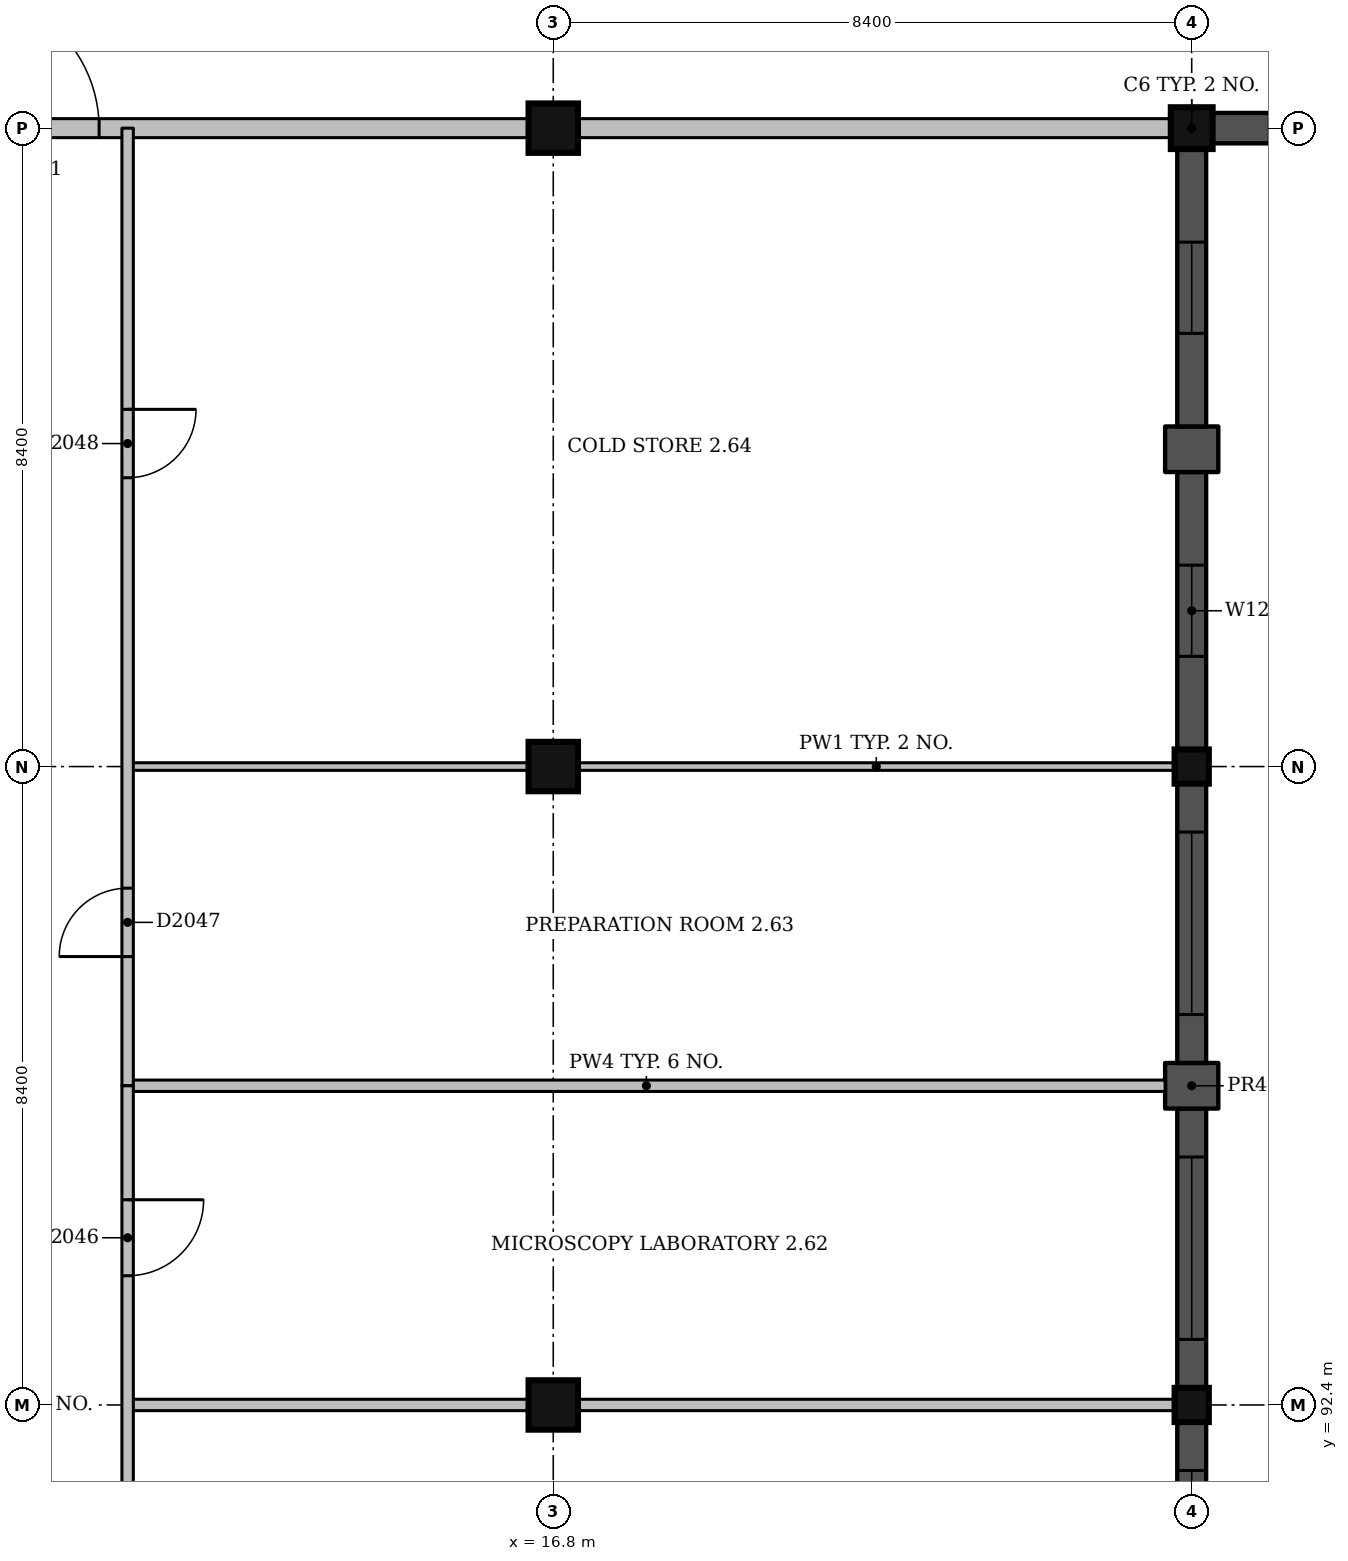
"""IFC4 building model, lengths in metres.
Left out: names, types, materials, properties, quantities, classifications, styles, units other than length and angle.
Written with IfcOpenShell. Run it as: python <this file> out.ifc"""

import sys

from ifc_helpers import new_model, si_unit, direction, frame, frame_2d, origin, origin_2d, place, context, subcontext, project, spatial, rectangle, extrude, element, fill, save


model = new_model("IFC4")
c1 = context("Model", 3, precision=1e-05, world=origin(), true_north=direction((0.0, 1.0)))
c2 = subcontext(c1, "Body", "Model", "MODEL_VIEW")
j1 = project(units=[si_unit("LENGTHUNIT", "METRE"), si_unit("PLANEANGLEUNIT", "RADIAN")], contexts=[c1])
p1 = place(None, origin())
s1 = spatial("IfcSite", under=j1, at=p1, CompositionType="ELEMENT")
p2 = place(p1, origin())
s2 = spatial("IfcBuilding", under=s1, at=p2, CompositionType="ELEMENT")
p3 = place(p2, frame((0.0, 0.0, 9.0)))
s3 = spatial("IfcBuildingStorey", under=s2, at=p3, CompositionType="ELEMENT", Elevation=9.0)
for number, where, z_axis, x_axis in (
    (1, (16.8, 92.4, 0.0), (0.0, 0.0, 1.0), (1.0, 0.0, 0.0)),
    (2, (16.8, 100.8, 0.0), (0.0, 0.0, 1.0), (1.0, 0.0, 0.0)),
    (3, (16.8, 109.2, 0.0), (0.0, 0.0, 1.0), (1.0, 0.0, 0.0)),
):
    element("IfcColumn", number, at=place(p3, frame(where, z_axis=z_axis, x_axis=x_axis)), inside=s3, PredefinedType="COLUMN", context=c2, shape_type="SweptSolid", body=[
        extrude(rectangle(XDim=0.65, YDim=0.65, at=origin_2d()), origin(), (0.0, 0.0, 1.0), 4.5),
    ])
for number, where, z_axis, x_axis in (
    (4, (25.2, 92.4, 0.0), (0.0, 0.0, 1.0), (1.0, 0.0, 0.0)),
    (5, (25.2, 100.8, 0.0), (0.0, 0.0, 1.0), (1.0, 0.0, 0.0)),
):
    element("IfcColumn", number, at=place(p3, frame(where, z_axis=z_axis, x_axis=x_axis)), inside=s3, PredefinedType="COLUMN", context=c2, shape_type="SweptSolid", body=[
        extrude(rectangle(XDim=0.45, YDim=0.45, at=origin_2d()), origin(), (0.0, 0.0, 1.0), 4.5),
    ])
p4 = place(p3, frame((25.2, 109.2, 0.0), z_axis=(0.0, 0.0, 1.0), x_axis=(1.0, 0.0, 0.0)))
e6 = element("IfcColumn", 6, at=p4, inside=s3, PredefinedType="COLUMN", context=c2, shape_type="SweptSolid", body=[
    extrude(rectangle(XDim=0.55, YDim=0.55, at=origin_2d()), origin(), (0.0, 0.0, 1.0), 4.5),
])
p5 = place(p3, frame((25.2, 88.5, 0.0), z_axis=(0.0, 0.0, 1.0), x_axis=(0.0, 1.0, 0.0)))
e7 = element("IfcWall", 7, at=p5, inside=s3, PredefinedType="SOLIDWALL", context=c2, shape_type="SweptSolid", body=[
    extrude(rectangle(XDim=3.675, YDim=0.38, at=frame_2d((1.837, 0.0))), origin(), (0.0, 0.0, 1.0), 3.35),
])
p6 = place(p5, frame((0.637, 0.0, 1.2)))
e8 = element("IfcOpeningElement", 8, at=p6, cuts=e7, PredefinedType="OPENING", context=c2, shape_type="SweptSolid", body=[
    extrude(rectangle(XDim=2.4, YDim=1.5, at=frame_2d((1.2, 0.75))), frame((0.0, 0.2, 0.0), z_axis=(0.0, -1.0, 0.0), x_axis=(1.0, 0.0, 0.0)), (0.0, 0.0, 1.0), 0.4),
])
p7 = place(p3, frame((25.2, 92.625, 0.0), z_axis=(0.0, 0.0, 1.0), x_axis=(0.0, 1.0, 0.0)))
e9 = element("IfcWall", 9, at=p7, inside=s3, PredefinedType="SOLIDWALL", context=c2, shape_type="SweptSolid", body=[
    extrude(rectangle(XDim=3.675, YDim=0.38, at=frame_2d((1.837, 0.0))), origin(), (0.0, 0.0, 1.0), 3.35),
])
p8 = place(p7, frame((0.637, 0.0, 1.2)))
e10 = element("IfcOpeningElement", 10, at=p8, cuts=e9, PredefinedType="OPENING", context=c2, shape_type="SweptSolid", body=[
    extrude(rectangle(XDim=2.4, YDim=1.5, at=frame_2d((1.2, 0.75))), frame((0.0, 0.2, 0.0), z_axis=(0.0, -1.0, 0.0), x_axis=(1.0, 0.0, 0.0)), (0.0, 0.0, 1.0), 0.4),
])
p9 = place(p3, frame((25.2, 96.3, 0.0), z_axis=(0.0, 0.0, 1.0), x_axis=(0.0, 1.0, 0.0)))
e11 = element("IfcWall", 11, at=p9, inside=s3, PredefinedType="SOLIDWALL", context=c2, shape_type="SweptSolid", body=[
    extrude(rectangle(XDim=0.6, YDim=0.7, at=frame_2d((0.3, 0.0))), origin(), (0.0, 0.0, 1.0), 3.35),
])
p10 = place(p3, frame((25.2, 96.9, 0.0), z_axis=(0.0, 0.0, 1.0), x_axis=(0.0, 1.0, 0.0)))
e12 = element("IfcWall", 12, at=p10, inside=s3, PredefinedType="SOLIDWALL", context=c2, shape_type="SweptSolid", body=[
    extrude(rectangle(XDim=3.675, YDim=0.38, at=frame_2d((1.837, 0.0))), origin(), (0.0, 0.0, 1.0), 3.35),
])
p11 = place(p10, frame((0.637, 0.0, 1.2)))
e13 = element("IfcOpeningElement", 13, at=p11, cuts=e12, PredefinedType="OPENING", context=c2, shape_type="SweptSolid", body=[
    extrude(rectangle(XDim=2.4, YDim=1.5, at=frame_2d((1.2, 0.75))), frame((0.0, 0.2, 0.0), z_axis=(0.0, -1.0, 0.0), x_axis=(1.0, 0.0, 0.0)), (0.0, 0.0, 1.0), 0.4),
])
p12 = place(p3, frame((25.2, 101.025, 0.0), z_axis=(0.0, 0.0, 1.0), x_axis=(0.0, 1.0, 0.0)))
e14 = element("IfcWall", 14, at=p12, inside=s3, PredefinedType="SOLIDWALL", context=c2, shape_type="SweptSolid", body=[
    extrude(rectangle(XDim=3.65, YDim=0.38, at=frame_2d((1.825, 0.0))), origin(), (0.0, 0.0, 1.0), 3.35),
])
p13 = place(p12, frame((1.225, 0.0, 2.4)))
e15 = element("IfcOpeningElement", 15, at=p13, cuts=e14, PredefinedType="OPENING", context=c2, shape_type="SweptSolid", body=[
    extrude(rectangle(XDim=1.2, YDim=0.6, at=frame_2d((0.6, 0.3))), frame((0.0, 0.2, 0.0), z_axis=(0.0, -1.0, 0.0), x_axis=(1.0, 0.0, 0.0)), (0.0, 0.0, 1.0), 0.4),
])
p14 = place(p3, frame((25.2, 104.675, 0.0), z_axis=(0.0, 0.0, 1.0), x_axis=(0.0, 1.0, 0.0)))
e16 = element("IfcWall", 16, at=p14, inside=s3, PredefinedType="SOLIDWALL", context=c2, shape_type="SweptSolid", body=[
    extrude(rectangle(XDim=0.6, YDim=0.7, at=frame_2d((0.3, 0.0))), origin(), (0.0, 0.0, 1.0), 3.35),
])
p15 = place(p3, frame((25.2, 105.275, 0.0), z_axis=(0.0, 0.0, 1.0), x_axis=(0.0, 1.0, 0.0)))
e17 = element("IfcWall", 17, at=p15, inside=s3, PredefinedType="SOLIDWALL", context=c2, shape_type="SweptSolid", body=[
    extrude(rectangle(XDim=3.65, YDim=0.38, at=frame_2d((1.825, 0.0))), origin(), (0.0, 0.0, 1.0), 3.35),
])
p16 = place(p15, frame((1.225, 0.0, 2.4)))
e18 = element("IfcOpeningElement", 18, at=p16, cuts=e17, PredefinedType="OPENING", context=c2, shape_type="SweptSolid", body=[
    extrude(rectangle(XDim=1.2, YDim=0.6, at=frame_2d((0.6, 0.3))), frame((0.0, 0.2, 0.0), z_axis=(0.0, -1.0, 0.0), x_axis=(1.0, 0.0, 0.0)), (0.0, 0.0, 1.0), 0.4),
])
p17 = place(p3, frame((25.475, 109.2, 0.0), z_axis=(0.0, 0.0, 1.0), x_axis=(1.0, 0.0, 0.0)))
e19 = element("IfcWall", 19, at=p17, inside=s3, PredefinedType="SOLIDWALL", context=c2, shape_type="SweptSolid", body=[
    extrude(rectangle(XDim=3.89, YDim=0.4, at=frame_2d((1.945, 0.0))), origin(), (0.0, 0.0, 1.0), 4.2),
])
p18 = place(p17, frame((0.745, 0.0, 0.6)))
e20 = element("IfcOpeningElement", 20, at=p18, cuts=e19, PredefinedType="OPENING", context=c2, shape_type="SweptSolid", body=[
    extrude(rectangle(XDim=2.4, YDim=2.4, at=frame_2d((1.2, 1.2))), frame((0.0, 0.21, 0.0), z_axis=(0.0, -1.0, 0.0), x_axis=(1.0, 0.0, 0.0)), (0.0, 0.0, 1.0), 0.42),
])
p19 = place(p3, frame((11.2, 92.4, 0.0), z_axis=(0.0, 0.0, 1.0), x_axis=(1.0, 0.0, 0.0)))
e21 = element("IfcWall", 21, at=p19, inside=s3, PredefinedType="PARTITIONING", context=c2, shape_type="SweptSolid", body=[
    extrude(rectangle(XDim=5.275, YDim=0.15, at=frame_2d((2.638, 0.0))), origin(), (0.0, 0.0, 1.0), 3.4),
])
p20 = place(p3, frame((17.125, 92.4, 0.0), z_axis=(0.0, 0.0, 1.0), x_axis=(1.0, 0.0, 0.0)))
e22 = element("IfcWall", 22, at=p20, inside=s3, PredefinedType="PARTITIONING", context=c2, shape_type="SweptSolid", body=[
    extrude(rectangle(XDim=7.85, YDim=0.15, at=frame_2d((3.925, 0.0))), origin(), (0.0, 0.0, 1.0), 3.4),
])
p21 = place(p3, frame((11.2, 96.6, 0.0), z_axis=(0.0, 0.0, 1.0), x_axis=(1.0, 0.0, 0.0)))
e23 = element("IfcWall", 23, at=p21, inside=s3, PredefinedType="PARTITIONING", context=c2, shape_type="SweptSolid", body=[
    extrude(rectangle(XDim=13.65, YDim=0.15, at=frame_2d((6.825, 0.0))), origin(), (0.0, 0.0, 1.0), 3.4),
])
p22 = place(p3, frame((11.2, 100.8, 0.0), z_axis=(0.0, 0.0, 1.0), x_axis=(1.0, 0.0, 0.0)))
e24 = element("IfcWall", 24, at=p22, inside=s3, PredefinedType="PARTITIONING", context=c2, shape_type="SweptSolid", body=[
    extrude(rectangle(XDim=5.275, YDim=0.1, at=frame_2d((2.638, 0.0))), origin(), (0.0, 0.0, 1.0), 3.4),
])
p23 = place(p3, frame((17.125, 100.8, 0.0), z_axis=(0.0, 0.0, 1.0), x_axis=(1.0, 0.0, 0.0)))
e25 = element("IfcWall", 25, at=p23, inside=s3, PredefinedType="PARTITIONING", context=c2, shape_type="SweptSolid", body=[
    extrude(rectangle(XDim=7.85, YDim=0.1, at=frame_2d((3.925, 0.0))), origin(), (0.0, 0.0, 1.0), 3.4),
])
p24 = place(p3, frame((8.725, 109.2, 0.0), z_axis=(0.0, 0.0, 1.0), x_axis=(1.0, 0.0, 0.0)))
e26 = element("IfcWall", 26, at=p24, inside=s3, PredefinedType="SOLIDWALL", context=c2, shape_type="SweptSolid", body=[
    extrude(rectangle(XDim=7.75, YDim=0.25, at=frame_2d((3.875, 0.0))), origin(), (0.0, 0.0, 1.0), 4.15),
])
p25 = place(p24, frame((0.3, 0.0, 0.0)))
e27 = element("IfcOpeningElement", 27, at=p25, cuts=e26, PredefinedType="OPENING", context=c2, shape_type="SweptSolid", body=[
    extrude(rectangle(XDim=1.8, YDim=2.1, at=frame_2d((0.9, 1.05))), frame((0.0, 0.135, 0.0), z_axis=(0.0, -1.0, 0.0), x_axis=(1.0, 0.0, 0.0)), (0.0, 0.0, 1.0), 0.27),
])
p26 = place(p3, frame((17.125, 109.2, 0.0), z_axis=(0.0, 0.0, 1.0), x_axis=(1.0, 0.0, 0.0)))
e28 = element("IfcWall", 28, at=p26, inside=s3, PredefinedType="SOLIDWALL", context=c2, shape_type="SweptSolid", body=[
    extrude(rectangle(XDim=7.8, YDim=0.25, at=frame_2d((3.9, 0.0))), origin(), (0.0, 0.0, 1.0), 3.35),
])
p27 = place(p3, frame((11.2, 96.6, 0.0), z_axis=(0.0, 0.0, 1.0), x_axis=(0.0, 1.0, 0.0)))
e29 = element("IfcWall", 29, at=p27, inside=s3, PredefinedType="PARTITIONING", context=c2, shape_type="SweptSolid", body=[
    extrude(rectangle(XDim=12.6, YDim=0.15, at=frame_2d((6.3, 0.0))), origin(), (0.0, 0.0, 1.0), 3.4),
])
p28 = place(p27, frame((1.7, 0.0, 0.0)))
e30 = element("IfcOpeningElement", 30, at=p28, cuts=e29, PredefinedType="OPENING", context=c2, shape_type="SweptSolid", body=[
    extrude(rectangle(XDim=0.9, YDim=2.1, at=frame_2d((0.45, 1.05))), frame((0.0, 0.085, 0.0), z_axis=(0.0, -1.0, 0.0), x_axis=(1.0, 0.0, 0.0)), (0.0, 0.0, 1.0), 0.17),
])
p29 = place(p27, frame((8.0, 0.0, 0.0)))
e31 = element("IfcOpeningElement", 31, at=p29, cuts=e29, PredefinedType="OPENING", context=c2, shape_type="SweptSolid", body=[
    extrude(rectangle(XDim=0.9, YDim=2.1, at=frame_2d((0.45, 1.05))), frame((0.0, 0.085, 0.0), z_axis=(0.0, -1.0, 0.0), x_axis=(1.0, 0.0, 0.0)), (0.0, 0.0, 1.0), 0.17),
])
p30 = place(p3, frame((11.2, 84.0, 0.0), z_axis=(0.0, 0.0, 1.0), x_axis=(0.0, 1.0, 0.0)))
e32 = element("IfcWall", 32, at=p30, inside=s3, PredefinedType="PARTITIONING", context=c2, shape_type="SweptSolid", body=[
    extrude(rectangle(XDim=12.6, YDim=0.15, at=frame_2d((6.3, 0.0))), origin(), (0.0, 0.0, 1.0), 3.4),
])
p31 = place(p30, frame((10.1, 0.0, 0.0)))
e33 = element("IfcOpeningElement", 33, at=p31, cuts=e32, PredefinedType="OPENING", context=c2, shape_type="SweptSolid", body=[
    extrude(rectangle(XDim=1.0, YDim=2.1, at=frame_2d((0.5, 1.05))), frame((0.0, 0.085, 0.0), z_axis=(0.0, -1.0, 0.0), x_axis=(1.0, 0.0, 0.0)), (0.0, 0.0, 1.0), 0.17),
])
p32 = place(p6, origin())
e34 = element("IfcWindow", 34, at=p32, inside=s3, PartitioningType="SINGLE_PANEL", PredefinedType="WINDOW", context=c2, shape_type="SweptSolid", body=[
    extrude(rectangle(XDim=2.4, YDim=1.5, at=frame_2d((1.2, 0.75))), frame((0.0, 0.15, 0.0), z_axis=(0.0, -1.0, 0.0), x_axis=(1.0, 0.0, 0.0)), (0.0, 0.0, 1.0), 0.06),
])
fill(e8, e34)
p33 = place(p8, origin())
e35 = element("IfcWindow", 35, at=p33, inside=s3, PartitioningType="SINGLE_PANEL", PredefinedType="WINDOW", context=c2, shape_type="SweptSolid", body=[
    extrude(rectangle(XDim=2.4, YDim=1.5, at=frame_2d((1.2, 0.75))), frame((0.0, 0.15, 0.0), z_axis=(0.0, -1.0, 0.0), x_axis=(1.0, 0.0, 0.0)), (0.0, 0.0, 1.0), 0.06),
])
fill(e10, e35)
p34 = place(p11, origin())
e36 = element("IfcWindow", 36, at=p34, inside=s3, PartitioningType="SINGLE_PANEL", PredefinedType="WINDOW", context=c2, shape_type="SweptSolid", body=[
    extrude(rectangle(XDim=2.4, YDim=1.5, at=frame_2d((1.2, 0.75))), frame((0.0, 0.15, 0.0), z_axis=(0.0, -1.0, 0.0), x_axis=(1.0, 0.0, 0.0)), (0.0, 0.0, 1.0), 0.06),
])
fill(e13, e36)
p35 = place(p13, origin())
e37 = element("IfcWindow", 37, at=p35, inside=s3, PartitioningType="SINGLE_PANEL", PredefinedType="WINDOW", context=c2, shape_type="SweptSolid", body=[
    extrude(rectangle(XDim=1.2, YDim=0.6, at=frame_2d((0.6, 0.3))), frame((0.0, 0.15, 0.0), z_axis=(0.0, -1.0, 0.0), x_axis=(1.0, 0.0, 0.0)), (0.0, 0.0, 1.0), 0.06),
])
fill(e15, e37)
p36 = place(p16, origin())
e38 = element("IfcWindow", 38, at=p36, inside=s3, PartitioningType="SINGLE_PANEL", PredefinedType="WINDOW", context=c2, shape_type="SweptSolid", body=[
    extrude(rectangle(XDim=1.2, YDim=0.6, at=frame_2d((0.6, 0.3))), frame((0.0, 0.15, 0.0), z_axis=(0.0, -1.0, 0.0), x_axis=(1.0, 0.0, 0.0)), (0.0, 0.0, 1.0), 0.06),
])
fill(e18, e38)
p37 = place(p31, origin())
e39 = element("IfcDoor", 39, at=p37, inside=s3, OperationType="SINGLE_SWING_RIGHT", PredefinedType="DOOR", context=c2, shape_type="SweptSolid", body=[
    extrude(rectangle(XDim=1.0, YDim=2.1, at=frame_2d((0.5, 1.05))), frame((0.0, 0.025, 0.0), z_axis=(0.0, -1.0, 0.0), x_axis=(1.0, 0.0, 0.0)), (0.0, 0.0, 1.0), 0.05),
])
fill(e33, e39)
p38 = place(p28, origin())
e40 = element("IfcDoor", 40, at=p38, inside=s3, OperationType="SINGLE_SWING_LEFT", PredefinedType="DOOR", context=c2, shape_type="SweptSolid", body=[
    extrude(rectangle(XDim=0.9, YDim=2.1, at=frame_2d((0.45, 1.05))), frame((0.0, 0.025, 0.0), z_axis=(0.0, -1.0, 0.0), x_axis=(1.0, 0.0, 0.0)), (0.0, 0.0, 1.0), 0.05),
])
fill(e30, e40)
p39 = place(p29, origin())
e41 = element("IfcDoor", 41, at=p39, inside=s3, OperationType="SINGLE_SWING_RIGHT", PredefinedType="DOOR", context=c2, shape_type="SweptSolid", body=[
    extrude(rectangle(XDim=0.9, YDim=2.1, at=frame_2d((0.45, 1.05))), frame((0.0, 0.025, 0.0), z_axis=(0.0, -1.0, 0.0), x_axis=(1.0, 0.0, 0.0)), (0.0, 0.0, 1.0), 0.05),
])
fill(e31, e41)
p40 = place(p25, origin())
e42 = element("IfcDoor", 42, at=p40, inside=s3, OperationType="DOUBLE_DOOR_SINGLE_SWING", PredefinedType="DOOR", context=c2, shape_type="SweptSolid", body=[
    extrude(rectangle(XDim=1.8, YDim=2.1, at=frame_2d((0.9, 1.05))), frame((0.0, 0.025, 0.0), z_axis=(0.0, -1.0, 0.0), x_axis=(1.0, 0.0, 0.0)), (0.0, 0.0, 1.0), 0.05),
])
fill(e27, e42)
save(model, sys.argv[1])
